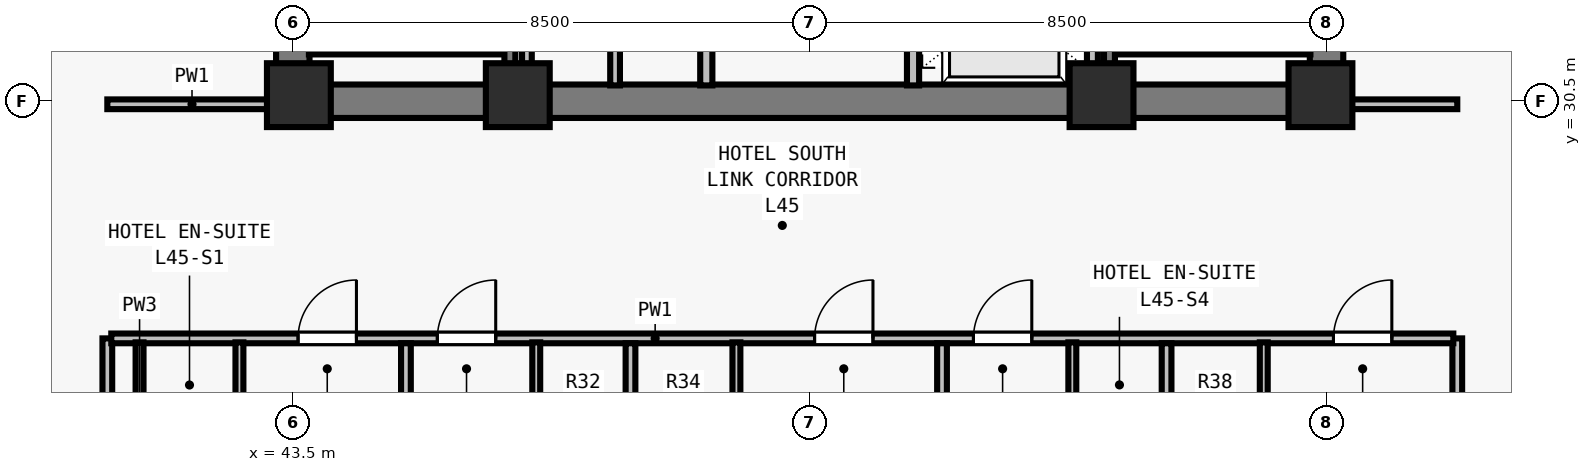
"""IFC4 building model, lengths in metres.
Left out: names, types, materials, properties, quantities, classifications, styles, units other than length and angle.
Written with IfcOpenShell. Run it as: python <this file> out.ifc"""

import sys

from ifc_helpers import new_model, si_unit, direction, frame, frame_2d, origin, origin_2d, place, context, subcontext, project, spatial, rectangle, extrude, element, fill, save


model = new_model("IFC4")
c1 = context("Model", 3, precision=1e-05, world=origin(), true_north=direction((0.0, 1.0)))
c2 = subcontext(c1, "Body", "Model", "MODEL_VIEW")
j1 = project(units=[si_unit("LENGTHUNIT", "METRE"), si_unit("PLANEANGLEUNIT", "RADIAN")], contexts=[c1])
p1 = place(None, origin())
s1 = spatial("IfcSite", under=j1, at=p1, CompositionType="ELEMENT")
p2 = place(p1, origin())
s2 = spatial("IfcBuilding", under=s1, at=p2, CompositionType="ELEMENT")
p3 = place(p2, frame((0.0, 0.0, 165.5)))
s3 = spatial("IfcBuildingStorey", under=s2, at=p3, CompositionType="ELEMENT", Elevation=165.5)
for number, where, z_axis, x_axis in (
    (1, (43.6, 30.6, 0.0), (0.0, 0.0, 1.0), (1.0, 0.0, 0.0)),
    (2, (47.2, 30.6, 0.0), (0.0, 0.0, 1.0), (1.0, 0.0, 0.0)),
    (3, (56.8, 30.6, 0.0), (0.0, 0.0, 1.0), (1.0, 0.0, 0.0)),
    (4, (60.4, 30.6, 0.0), (0.0, 0.0, 1.0), (1.0, 0.0, 0.0)),
):
    element("IfcColumn", number, at=place(p3, frame(where, z_axis=z_axis, x_axis=x_axis)), inside=s3, PredefinedType="COLUMN", context=c2, shape_type="SweptSolid", body=[
        extrude(rectangle(XDim=1.05, YDim=1.05, at=origin_2d()), origin(), (0.0, 0.0, 1.0), 3.5),
    ])
p4 = place(p3, frame((43.225, 30.5, 0.0), z_axis=(0.0, 0.0, 1.0), x_axis=(1.0, 0.0, 0.0)))
e5 = element("IfcWall", 5, at=p4, inside=s3, PredefinedType="SHEAR", context=c2, shape_type="SweptSolid", body=[
    extrude(rectangle(XDim=17.55, YDim=0.55, at=frame_2d((8.775, 0.0))), origin(), (0.0, 0.0, 1.0), 3.28),
])
for number, where, z_axis, x_axis in (
    (6, (43.5, 30.765, 0.0), (0.0, 0.0, 1.0), (0.0, 1.0, 0.0)),
    (7, (60.5, 30.765, 0.0), (0.0, 0.0, 1.0), (0.0, 1.0, 0.0)),
):
    element("IfcWall", number, at=place(p3, frame(where, z_axis=z_axis, x_axis=x_axis)), inside=s3, PredefinedType="SHEAR", context=c2, shape_type="SweptSolid", body=[
        extrude(rectangle(XDim=7.985, YDim=0.55, at=frame_2d((3.993, 0.0))), origin(), (0.0, 0.0, 1.0), 3.28),
    ])
p5 = place(p3, frame((50.3, 30.76, 0.0), z_axis=(0.0, 0.0, 1.0), x_axis=(0.0, 1.0, 0.0)))
e8 = element("IfcWall", 8, at=p5, inside=s3, PredefinedType="SOLIDWALL", context=c2, shape_type="SweptSolid", body=[
    extrude(rectangle(XDim=7.855, YDim=0.2, at=frame_2d((3.927, 0.0))), origin(), (0.0, 0.0, 1.0), 3.28),
])
p6 = place(p5, frame((2.09, 0.0, 0.0)))
e9 = element("IfcOpeningElement", 9, at=p6, cuts=e8, PredefinedType="OPENING", context=c2, shape_type="SweptSolid", body=[
    extrude(rectangle(XDim=0.95, YDim=2.12, at=frame_2d((0.475, 1.06))), frame((0.0, 0.11, 0.0), z_axis=(0.0, -1.0, 0.0), x_axis=(1.0, 0.0, 0.0)), (0.0, 0.0, 1.0), 0.22),
])
p7 = place(p3, frame((53.7, 30.76, 0.0), z_axis=(0.0, 0.0, 1.0), x_axis=(0.0, 1.0, 0.0)))
e10 = element("IfcWall", 10, at=p7, inside=s3, PredefinedType="SOLIDWALL", context=c2, shape_type="SweptSolid", body=[
    extrude(rectangle(XDim=7.855, YDim=0.2, at=frame_2d((3.927, 0.0))), origin(), (0.0, 0.0, 1.0), 3.28),
])
p8 = place(p7, frame((0.79, 0.0, 0.0)))
e11 = element("IfcOpeningElement", 11, at=p8, cuts=e10, PredefinedType="OPENING", context=c2, shape_type="SweptSolid", body=[
    extrude(rectangle(XDim=1.1, YDim=2.2, at=frame_2d((0.55, 1.1))), frame((0.0, 0.11, 0.0), z_axis=(0.0, -1.0, 0.0), x_axis=(1.0, 0.0, 0.0)), (0.0, 0.0, 1.0), 0.22),
])
p9 = place(p7, frame((3.49, 0.0, 0.0)))
e12 = element("IfcOpeningElement", 12, at=p9, cuts=e10, PredefinedType="OPENING", context=c2, shape_type="SweptSolid", body=[
    extrude(rectangle(XDim=1.1, YDim=2.2, at=frame_2d((0.55, 1.1))), frame((0.0, 0.11, 0.0), z_axis=(0.0, -1.0, 0.0), x_axis=(1.0, 0.0, 0.0)), (0.0, 0.0, 1.0), 0.22),
])
p10 = place(p7, frame((6.19, 0.0, 0.0)))
e13 = element("IfcOpeningElement", 13, at=p10, cuts=e10, PredefinedType="OPENING", context=c2, shape_type="SweptSolid", body=[
    extrude(rectangle(XDim=1.1, YDim=2.2, at=frame_2d((0.55, 1.1))), frame((0.0, 0.11, 0.0), z_axis=(0.0, -1.0, 0.0), x_axis=(1.0, 0.0, 0.0)), (0.0, 0.0, 1.0), 0.22),
])
p11 = place(p3, frame((47.35, 30.76, 0.0), z_axis=(0.0, 0.0, 1.0), x_axis=(0.0, 1.0, 0.0)))
e14 = element("IfcWall", 14, at=p11, inside=s3, PredefinedType="PARTITIONING", context=c2, shape_type="SweptSolid", body=[
    extrude(rectangle(XDim=7.855, YDim=0.16, at=frame_2d((3.927, 0.0))), origin(), (0.0, 0.0, 1.0), 3.28),
])
p12 = place(p3, frame((48.8, 30.76, 0.0), z_axis=(0.0, 0.0, 1.0), x_axis=(0.0, 1.0, 0.0)))
e15 = element("IfcWall", 15, at=p12, inside=s3, PredefinedType="PARTITIONING", context=c2, shape_type="SweptSolid", body=[
    extrude(rectangle(XDim=7.855, YDim=0.16, at=frame_2d((3.927, 0.0))), origin(), (0.0, 0.0, 1.0), 3.28),
])
p13 = place(p12, frame((3.49, 0.0, 0.0)))
e16 = element("IfcOpeningElement", 16, at=p13, cuts=e15, PredefinedType="OPENING", context=c2, shape_type="SweptSolid", body=[
    extrude(rectangle(XDim=0.85, YDim=2.12, at=frame_2d((0.425, 1.06))), frame((0.0, 0.09, 0.0), z_axis=(0.0, -1.0, 0.0), x_axis=(1.0, 0.0, 0.0)), (0.0, 0.0, 1.0), 0.18),
])
p14 = place(p3, frame((56.65, 30.76, 0.0), z_axis=(0.0, 0.0, 1.0), x_axis=(0.0, 1.0, 0.0)))
e17 = element("IfcWall", 17, at=p14, inside=s3, PredefinedType="SOLIDWALL", context=c2, shape_type="SweptSolid", body=[
    extrude(rectangle(XDim=7.855, YDim=0.18, at=frame_2d((3.927, 0.0))), origin(), (0.0, 0.0, 1.0), 3.28),
])
p15 = place(p3, frame((40.45, 15.325, 0.0), z_axis=(0.0, 0.0, 1.0), x_axis=(0.0, 1.0, 0.0)))
e18 = element("IfcWall", 18, at=p15, inside=s3, PredefinedType="PARTITIONING", context=c2, shape_type="SweptSolid", body=[
    extrude(rectangle(XDim=11.275, YDim=0.16, at=frame_2d((5.638, 0.0))), origin(), (0.0, 0.0, 1.0), 2.555),
])
p16 = place(p3, frame((40.45, 30.45, 0.0), z_axis=(0.0, 0.0, 1.0), x_axis=(1.0, 0.0, 0.0)))
e19 = element("IfcWall", 19, at=p16, inside=s3, PredefinedType="PARTITIONING", context=c2, shape_type="SweptSolid", body=[
    extrude(rectangle(XDim=2.785, YDim=0.16, at=frame_2d((1.393, 0.0))), origin(), (0.0, 0.0, 1.0), 3.28),
])
p17 = place(p3, frame((62.65, 15.27, 0.0), z_axis=(0.0, 0.0, 1.0), x_axis=(0.0, 1.0, 0.0)))
e20 = element("IfcWall", 20, at=p17, inside=s3, PredefinedType="PARTITIONING", context=c2, shape_type="SweptSolid", body=[
    extrude(rectangle(XDim=11.33, YDim=0.16, at=frame_2d((5.665, 0.0))), origin(), (0.0, 0.0, 1.0), 3.28),
])
p18 = place(p3, frame((60.765, 30.45, 0.0), z_axis=(0.0, 0.0, 1.0), x_axis=(1.0, 0.0, 0.0)))
e21 = element("IfcWall", 21, at=p18, inside=s3, PredefinedType="PARTITIONING", context=c2, shape_type="SweptSolid", body=[
    extrude(rectangle(XDim=1.885, YDim=0.16, at=frame_2d((0.942, 0.0))), origin(), (0.0, 0.0, 1.0), 3.28),
])
p19 = place(p3, frame((40.515, 26.6, 0.0), z_axis=(0.0, 0.0, 1.0), x_axis=(1.0, 0.0, 0.0)))
e22 = element("IfcWall", 22, at=p19, inside=s3, PredefinedType="PARTITIONING", context=c2, shape_type="SweptSolid", body=[
    extrude(rectangle(XDim=22.07, YDim=0.16, at=frame_2d((11.035, 0.0))), origin(), (0.0, 0.0, 1.0), 3.28),
])
p20 = place(p19, frame((3.072, 0.0, 0.0)))
e23 = element("IfcOpeningElement", 23, at=p20, cuts=e22, PredefinedType="OPENING", context=c2, shape_type="SweptSolid", body=[
    extrude(rectangle(XDim=0.96, YDim=2.15, at=frame_2d((0.48, 1.075))), frame((0.0, 0.09, 0.0), z_axis=(0.0, -1.0, 0.0), x_axis=(1.0, 0.0, 0.0)), (0.0, 0.0, 1.0), 0.18),
])
p21 = place(p19, frame((5.362, 0.0, 0.0)))
e24 = element("IfcOpeningElement", 24, at=p21, cuts=e22, PredefinedType="OPENING", context=c2, shape_type="SweptSolid", body=[
    extrude(rectangle(XDim=0.96, YDim=2.15, at=frame_2d((0.48, 1.075))), frame((0.0, 0.09, 0.0), z_axis=(0.0, -1.0, 0.0), x_axis=(1.0, 0.0, 0.0)), (0.0, 0.0, 1.0), 0.18),
])
p22 = place(p19, frame((11.566, 0.0, 0.0)))
e25 = element("IfcOpeningElement", 25, at=p22, cuts=e22, PredefinedType="OPENING", context=c2, shape_type="SweptSolid", body=[
    extrude(rectangle(XDim=0.96, YDim=2.15, at=frame_2d((0.48, 1.075))), frame((0.0, 0.09, 0.0), z_axis=(0.0, -1.0, 0.0), x_axis=(1.0, 0.0, 0.0)), (0.0, 0.0, 1.0), 0.18),
])
p23 = place(p19, frame((14.178, 0.0, 0.0)))
e26 = element("IfcOpeningElement", 26, at=p23, cuts=e22, PredefinedType="OPENING", context=c2, shape_type="SweptSolid", body=[
    extrude(rectangle(XDim=0.96, YDim=2.15, at=frame_2d((0.48, 1.075))), frame((0.0, 0.09, 0.0), z_axis=(0.0, -1.0, 0.0), x_axis=(1.0, 0.0, 0.0)), (0.0, 0.0, 1.0), 0.18),
])
p24 = place(p19, frame((20.099, 0.0, 0.0)))
e27 = element("IfcOpeningElement", 27, at=p24, cuts=e22, PredefinedType="OPENING", context=c2, shape_type="SweptSolid", body=[
    extrude(rectangle(XDim=0.96, YDim=2.15, at=frame_2d((0.48, 1.075))), frame((0.0, 0.09, 0.0), z_axis=(0.0, -1.0, 0.0), x_axis=(1.0, 0.0, 0.0)), (0.0, 0.0, 1.0), 0.18),
])
for number, where, z_axis, x_axis in (
    (28, (40.98, 24.22, 0.0), (0.0, 0.0, 1.0), (0.0, 1.0, 0.0)),
    (29, (42.622, 24.22, 0.0), (0.0, 0.0, 1.0), (0.0, 1.0, 0.0)),
):
    element("IfcWall", number, at=place(p3, frame(where, z_axis=z_axis, x_axis=x_axis)), inside=s3, PredefinedType="PLUMBINGWALL", context=c2, shape_type="SweptSolid", body=[
        extrude(rectangle(XDim=2.315, YDim=0.13, at=frame_2d((1.157, 0.0))), origin(), (0.0, 0.0, 1.0), 3.28),
    ])
p25 = place(p3, frame((45.361, 15.325, 0.0), z_axis=(0.0, 0.0, 1.0), x_axis=(0.0, 1.0, 0.0)))
e30 = element("IfcWall", 30, at=p25, inside=s3, PredefinedType="PARTITIONING", context=c2, shape_type="SweptSolid", body=[
    extrude(rectangle(XDim=11.195, YDim=0.16, at=frame_2d((5.598, 0.0))), origin(), (0.0, 0.0, 1.0), 3.28),
])
p26 = place(p3, frame((47.503, 24.22, 0.0), z_axis=(0.0, 0.0, 1.0), x_axis=(0.0, 1.0, 0.0)))
e31 = element("IfcWall", 31, at=p26, inside=s3, PredefinedType="PLUMBINGWALL", context=c2, shape_type="SweptSolid", body=[
    extrude(rectangle(XDim=2.315, YDim=0.13, at=frame_2d((1.157, 0.0))), origin(), (0.0, 0.0, 1.0), 3.28),
])
p27 = place(p3, frame((49.053, 15.325, 0.0), z_axis=(0.0, 0.0, 1.0), x_axis=(0.0, 1.0, 0.0)))
e32 = element("IfcWall", 32, at=p27, inside=s3, PredefinedType="PARTITIONING", context=c2, shape_type="SweptSolid", body=[
    extrude(rectangle(XDim=11.195, YDim=0.16, at=frame_2d((5.598, 0.0))), origin(), (0.0, 0.0, 1.0), 2.896),
])
p28 = place(p3, frame((50.795, 24.22, 0.0), z_axis=(0.0, 0.0, 1.0), x_axis=(0.0, 1.0, 0.0)))
e33 = element("IfcWall", 33, at=p28, inside=s3, PredefinedType="PLUMBINGWALL", context=c2, shape_type="SweptSolid", body=[
    extrude(rectangle(XDim=2.315, YDim=0.13, at=frame_2d((1.157, 0.0))), origin(), (0.0, 0.0, 1.0), 3.28),
])
p29 = place(p3, frame((54.177, 15.325, 0.0), z_axis=(0.0, 0.0, 1.0), x_axis=(0.0, 1.0, 0.0)))
e34 = element("IfcWall", 34, at=p29, inside=s3, PredefinedType="PARTITIONING", context=c2, shape_type="SweptSolid", body=[
    extrude(rectangle(XDim=11.195, YDim=0.16, at=frame_2d((5.598, 0.0))), origin(), (0.0, 0.0, 1.0), 2.896),
])
p30 = place(p3, frame((56.32, 24.22, 0.0), z_axis=(0.0, 0.0, 1.0), x_axis=(0.0, 1.0, 0.0)))
e35 = element("IfcWall", 35, at=p30, inside=s3, PredefinedType="PLUMBINGWALL", context=c2, shape_type="SweptSolid", body=[
    extrude(rectangle(XDim=2.315, YDim=0.13, at=frame_2d((1.157, 0.0))), origin(), (0.0, 0.0, 1.0), 3.28),
])
p31 = place(p3, frame((57.869, 17.262, 0.0), z_axis=(0.0, 0.0, 1.0), x_axis=(0.0, 1.0, 0.0)))
e36 = element("IfcWall", 36, at=p31, inside=s3, PredefinedType="PARTITIONING", context=c2, shape_type="SweptSolid", body=[
    extrude(rectangle(XDim=9.258, YDim=0.16, at=frame_2d((4.629, 0.0))), origin(), (0.0, 0.0, 1.0), 3.28),
])
p32 = place(p3, frame((59.468, 24.22, 0.0), z_axis=(0.0, 0.0, 1.0), x_axis=(0.0, 1.0, 0.0)))
e37 = element("IfcWall", 37, at=p32, inside=s3, PredefinedType="PLUMBINGWALL", context=c2, shape_type="SweptSolid", body=[
    extrude(rectangle(XDim=2.315, YDim=0.13, at=frame_2d((1.157, 0.0))), origin(), (0.0, 0.0, 1.0), 3.28),
])
p33 = place(p3, frame((43.765, 31.36, 0.0), z_axis=(0.0, 0.0, 1.0), x_axis=(1.0, 0.0, 0.0)))
e38 = element("IfcWall", 38, at=p33, inside=s3, PredefinedType="SOLIDWALL", context=c2, shape_type="SweptSolid", body=[
    extrude(rectangle(XDim=3.23, YDim=0.18, at=frame_2d((1.615, 0.0))), origin(), (0.0, 0.0, 1.0), 3.28),
])
p34 = place(p3, frame((47.07, 38.78, 0.0), z_axis=(0.0, 0.0, 1.0), x_axis=(0.0, -1.0, 0.0)))
e39 = element("IfcWall", 39, at=p34, inside=s3, PredefinedType="SOLIDWALL", context=c2, shape_type="SweptSolid", body=[
    extrude(rectangle(XDim=8.017, YDim=0.18, at=frame_2d((4.009, 0.0))), origin(), (0.0, 0.0, 1.0), 3.28),
])
p35 = place(p3, frame((57.005, 31.36, 0.0), z_axis=(0.0, 0.0, 1.0), x_axis=(1.0, 0.0, 0.0)))
e40 = element("IfcWall", 40, at=p35, inside=s3, PredefinedType="SOLIDWALL", context=c2, shape_type="SweptSolid", body=[
    extrude(rectangle(XDim=3.23, YDim=0.18, at=frame_2d((1.615, 0.0))), origin(), (0.0, 0.0, 1.0), 3.28),
])
p36 = place(p3, frame((56.93, 38.78, 0.0), z_axis=(0.0, 0.0, 1.0), x_axis=(0.0, -1.0, 0.0)))
e41 = element("IfcWall", 41, at=p36, inside=s3, PredefinedType="SOLIDWALL", context=c2, shape_type="SweptSolid", body=[
    extrude(rectangle(XDim=8.017, YDim=0.18, at=frame_2d((4.009, 0.0))), origin(), (0.0, 0.0, 1.0), 3.28),
])
p37 = place(p20, origin())
e42 = element("IfcDoor", 42, at=p37, inside=s3, OperationType="SINGLE_SWING_RIGHT", PredefinedType="DOOR", context=c2, shape_type="SweptSolid", body=[
    extrude(rectangle(XDim=0.96, YDim=2.15, at=frame_2d((0.48, 1.075))), frame((0.0, 0.025, 0.0), z_axis=(0.0, -1.0, 0.0), x_axis=(1.0, 0.0, 0.0)), (0.0, 0.0, 1.0), 0.05),
])
fill(e23, e42)
p38 = place(p21, origin())
e43 = element("IfcDoor", 43, at=p38, inside=s3, OperationType="SINGLE_SWING_RIGHT", PredefinedType="DOOR", context=c2, shape_type="SweptSolid", body=[
    extrude(rectangle(XDim=0.96, YDim=2.15, at=frame_2d((0.48, 1.075))), frame((0.0, 0.025, 0.0), z_axis=(0.0, -1.0, 0.0), x_axis=(1.0, 0.0, 0.0)), (0.0, 0.0, 1.0), 0.05),
])
fill(e24, e43)
p39 = place(p22, origin())
e44 = element("IfcDoor", 44, at=p39, inside=s3, OperationType="SINGLE_SWING_RIGHT", PredefinedType="DOOR", context=c2, shape_type="SweptSolid", body=[
    extrude(rectangle(XDim=0.96, YDim=2.15, at=frame_2d((0.48, 1.075))), frame((0.0, 0.025, 0.0), z_axis=(0.0, -1.0, 0.0), x_axis=(1.0, 0.0, 0.0)), (0.0, 0.0, 1.0), 0.05),
])
fill(e25, e44)
p40 = place(p23, origin())
e45 = element("IfcDoor", 45, at=p40, inside=s3, OperationType="SINGLE_SWING_RIGHT", PredefinedType="DOOR", context=c2, shape_type="SweptSolid", body=[
    extrude(rectangle(XDim=0.96, YDim=2.15, at=frame_2d((0.48, 1.075))), frame((0.0, 0.025, 0.0), z_axis=(0.0, -1.0, 0.0), x_axis=(1.0, 0.0, 0.0)), (0.0, 0.0, 1.0), 0.05),
])
fill(e26, e45)
p41 = place(p24, origin())
e46 = element("IfcDoor", 46, at=p41, inside=s3, OperationType="SINGLE_SWING_RIGHT", PredefinedType="DOOR", context=c2, shape_type="SweptSolid", body=[
    extrude(rectangle(XDim=0.96, YDim=2.15, at=frame_2d((0.48, 1.075))), frame((0.0, 0.025, 0.0), z_axis=(0.0, -1.0, 0.0), x_axis=(1.0, 0.0, 0.0)), (0.0, 0.0, 1.0), 0.05),
])
fill(e27, e46)
save(model, sys.argv[1])
